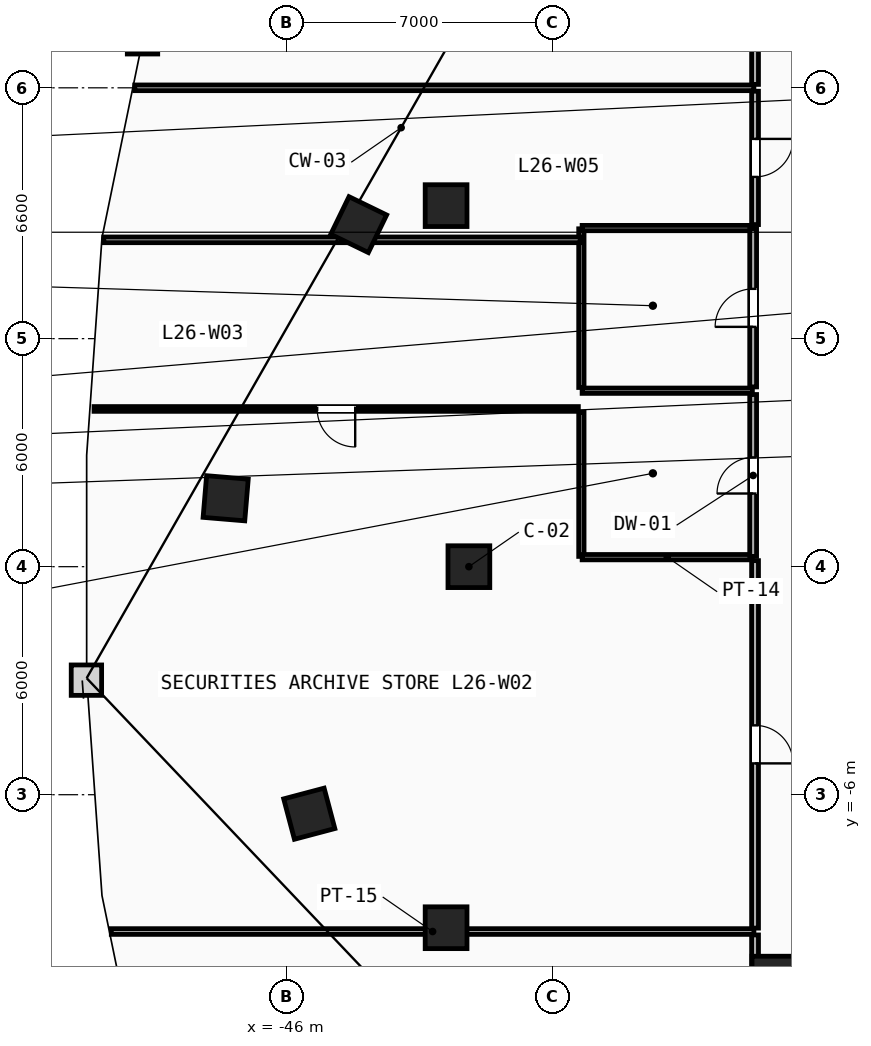
"""IFC4 building model, lengths in metres.
Left out: names, types, materials, properties, quantities, classifications, styles, units other than length and angle.
Written with IfcOpenShell. Run it as: python <this file> out.ifc"""

import sys

from ifc_helpers import new_model, si_unit, direction, frame, frame_2d, origin, origin_2d, place, context, subcontext, project, spatial, rectangle, extrude, element, fill, save


model = new_model("IFC4")
c1 = context("Model", 3, precision=1e-05, world=origin(), true_north=direction((0.0, 1.0)))
c2 = subcontext(c1, "Body", "Model", "MODEL_VIEW")
j1 = project(units=[si_unit("LENGTHUNIT", "METRE"), si_unit("PLANEANGLEUNIT", "RADIAN")], contexts=[c1])
p1 = place(None, origin())
s1 = spatial("IfcSite", under=j1, at=p1, CompositionType="ELEMENT")
p2 = place(p1, origin())
s2 = spatial("IfcBuilding", under=s1, at=p2, CompositionType="ELEMENT")
p3 = place(p2, frame((0.0, 0.0, 103.4)))
s3 = spatial("IfcBuildingStorey", under=s2, at=p3, CompositionType="ELEMENT", Elevation=103.4)
for number, where, z_axis, x_axis in (
    (1, (-41.2, 0.0, 0.0), (0.0, 0.0, 1.0), (1.0, 0.0, 0.0)),
    (2, (-41.8, 9.5, 0.0), (0.0, 0.0, 1.0), (1.0, 0.0, 0.0)),
    (3, (-41.8, -9.5, 0.0), (0.0, 0.0, 1.0), (1.0, 0.0, 0.0)),
    (4, (-33.2, -10.8, 0.0), (0.0, 0.0, 1.0), (1.0, 0.0, 0.0)),
    (5, (-44.1, 9.0, 0.0), (0.0, 0.0, 1.0), (-0.437, -0.899, 0.0)),
    (6, (-47.6, 1.8, 0.0), (0.0, 0.0, 1.0), (-0.084, -0.997, 0.0)),
    (7, (-45.4, -6.5, 0.0), (0.0, 0.0, 1.0), (0.256, -0.967, 0.0)),
):
    element("IfcColumn", number, at=place(p3, frame(where, z_axis=z_axis, x_axis=x_axis)), inside=s3, PredefinedType="COLUMN", context=c2, shape_type="SweptSolid", body=[
        extrude(rectangle(XDim=1.1, YDim=1.1, at=origin_2d()), origin(), (0.0, 0.0, 1.0), 3.6),
    ])
p4 = place(p3, frame((-38.24, 0.27, 0.0), z_axis=(0.0, 0.0, 1.0), x_axis=(0.0, 1.0, 0.0)))
e8 = element("IfcWall", 8, at=p4, inside=s3, PredefinedType="PARTITIONING", context=c2, shape_type="SweptSolid", body=[
    extrude(rectangle(XDim=3.795, YDim=0.14, at=frame_2d((1.897, 0.0))), origin(), (0.0, 0.0, 1.0), 3.3),
])
p5 = place(p3, frame((-38.24, 4.715, 0.0), z_axis=(0.0, 0.0, 1.0), x_axis=(0.0, 1.0, 0.0)))
e9 = element("IfcWall", 9, at=p5, inside=s3, PredefinedType="PARTITIONING", context=c2, shape_type="SweptSolid", body=[
    extrude(rectangle(XDim=4.175, YDim=0.14, at=frame_2d((2.087, 0.0))), origin(), (0.0, 0.0, 1.0), 3.3),
])
for number, where, z_axis, x_axis in (
    (10, (-38.22, 0.25, 0.0), (0.0, 0.0, 1.0), (1.0, 0.0, 0.0)),
    (11, (-38.22, 4.63, 0.0), (0.0, 0.0, 1.0), (1.0, 0.0, 0.0)),
    (12, (-38.22, 8.91, 0.0), (0.0, 0.0, 1.0), (1.0, 0.0, 0.0)),
):
    element("IfcWall", number, at=place(p3, frame(where, z_axis=z_axis, x_axis=x_axis)), inside=s3, PredefinedType="PARTITIONING", context=c2, shape_type="SweptSolid", body=[
        extrude(rectangle(XDim=4.48, YDim=0.14, at=frame_2d((2.24, 0.0))), origin(), (0.0, 0.0, 1.0), 3.3),
    ])
p6 = place(p3, frame((-33.72, 0.27, 0.0), z_axis=(0.0, 0.0, 1.0), x_axis=(0.0, 1.0, 0.0)))
e13 = element("IfcWall", 13, at=p6, inside=s3, PredefinedType="PARTITIONING", context=c2, shape_type="SweptSolid", body=[
    extrude(rectangle(XDim=4.26, YDim=0.18, at=frame_2d((2.13, 0.0))), origin(), (0.0, 0.0, 1.0), 3.3),
])
p7 = place(p6, frame((1.655, 0.0, 0.0)))
e14 = element("IfcOpeningElement", 14, at=p7, cuts=e13, PredefinedType="OPENING", context=c2, shape_type="SweptSolid", body=[
    extrude(rectangle(XDim=0.95, YDim=2.1, at=frame_2d((0.475, 1.05))), frame((0.0, 0.1, 0.0), z_axis=(0.0, -1.0, 0.0), x_axis=(1.0, 0.0, 0.0)), (0.0, 0.0, 1.0), 0.2),
])
p8 = place(p3, frame((-33.72, 4.73, 0.0), z_axis=(0.0, 0.0, 1.0), x_axis=(0.0, 1.0, 0.0)))
e15 = element("IfcWall", 15, at=p8, inside=s3, PredefinedType="PARTITIONING", context=c2, shape_type="SweptSolid", body=[
    extrude(rectangle(XDim=4.16, YDim=0.18, at=frame_2d((2.08, 0.0))), origin(), (0.0, 0.0, 1.0), 3.3),
])
p9 = place(p8, frame((1.58, 0.0, 0.0)))
e16 = element("IfcOpeningElement", 16, at=p9, cuts=e15, PredefinedType="OPENING", context=c2, shape_type="SweptSolid", body=[
    extrude(rectangle(XDim=1.0, YDim=2.15, at=frame_2d((0.5, 1.075))), frame((0.0, 0.1, 0.0), z_axis=(0.0, -1.0, 0.0), x_axis=(1.0, 0.0, 0.0)), (0.0, 0.0, 1.0), 0.2),
])
p10 = place(p3, frame((-50.61, -9.6, 0.0), z_axis=(0.0, 0.0, 1.0), x_axis=(1.0, 0.0, 0.0)))
e17 = element("IfcWall", 17, at=p10, inside=s3, PredefinedType="PARTITIONING", context=c2, shape_type="SweptSolid", body=[
    extrude(rectangle(XDim=16.91, YDim=0.15, at=frame_2d((8.455, 0.0))), origin(), (0.0, 0.0, 1.0), 2.605),
])
p11 = place(p3, frame((-50.809, 8.6, 0.0), z_axis=(0.0, 0.0, 1.0), x_axis=(1.0, 0.0, 0.0)))
e18 = element("IfcWall", 18, at=p11, inside=s3, PredefinedType="PARTITIONING", context=c2, shape_type="SweptSolid", body=[
    extrude(rectangle(XDim=12.539, YDim=0.15, at=frame_2d((6.269, 0.0))), origin(), (0.0, 0.0, 1.0), 3.3),
])
p12 = place(p3, frame((-49.993, 12.6, 0.0), z_axis=(0.0, 0.0, 1.0), x_axis=(1.0, 0.0, 0.0)))
e19 = element("IfcWall", 19, at=p12, inside=s3, PredefinedType="PARTITIONING", context=c2, shape_type="SweptSolid", body=[
    extrude(rectangle(XDim=16.293, YDim=0.15, at=frame_2d((8.146, 0.0))), origin(), (0.0, 0.0, 1.0), 3.3),
])
p13 = place(p3, frame((-33.67, -9.69, 0.0), z_axis=(0.0, 0.0, 1.0), x_axis=(0.0, -1.0, 0.0)))
e20 = element("IfcWall", 20, at=p13, inside=s3, PredefinedType="PARTITIONING", context=c2, shape_type="SweptSolid", body=[
    extrude(rectangle(XDim=1.71, YDim=0.18, at=frame_2d((0.855, 0.0))), origin(), (0.0, 0.0, 1.0), 3.3),
])
p14 = place(p3, frame((-33.67, 0.159, 0.0), z_axis=(0.0, 0.0, 1.0), x_axis=(0.0, -1.0, 0.0)))
e21 = element("IfcWall", 21, at=p14, inside=s3, PredefinedType="PARTITIONING", context=c2, shape_type="SweptSolid", body=[
    extrude(rectangle(XDim=9.669, YDim=0.18, at=frame_2d((4.834, 0.0))), origin(), (0.0, 0.0, 1.0), 3.3),
])
p15 = place(p14, frame((4.334, 0.0, 0.0)))
e22 = element("IfcOpeningElement", 22, at=p15, cuts=e21, PredefinedType="OPENING", context=c2, shape_type="SweptSolid", body=[
    extrude(rectangle(XDim=1.0, YDim=2.15, at=frame_2d((0.5, 1.075))), frame((0.0, 0.1, 0.0), z_axis=(0.0, -1.0, 0.0), x_axis=(1.0, 0.0, 0.0)), (0.0, 0.0, 1.0), 0.2),
])
p16 = place(p3, frame((-33.67, 17.428, 0.0), z_axis=(0.0, 0.0, 1.0), x_axis=(0.0, -1.0, 0.0)))
e23 = element("IfcWall", 23, at=p16, inside=s3, PredefinedType="PARTITIONING", context=c2, shape_type="SweptSolid", body=[
    extrude(rectangle(XDim=4.739, YDim=0.18, at=frame_2d((2.369, 0.0))), origin(), (0.0, 0.0, 1.0), 3.3),
])
p17 = place(p3, frame((-33.67, 12.51, 0.0), z_axis=(0.0, 0.0, 1.0), x_axis=(0.0, -1.0, 0.0)))
e24 = element("IfcWall", 24, at=p17, inside=s3, PredefinedType="PARTITIONING", context=c2, shape_type="SweptSolid", body=[
    extrude(rectangle(XDim=3.509, YDim=0.18, at=frame_2d((1.754, 0.0))), origin(), (0.0, 0.0, 1.0), 3.3),
])
p18 = place(p17, frame((1.254, 0.0, 0.0)))
e25 = element("IfcOpeningElement", 25, at=p18, cuts=e24, PredefinedType="OPENING", context=c2, shape_type="SweptSolid", body=[
    extrude(rectangle(XDim=1.0, YDim=2.15, at=frame_2d((0.5, 1.075))), frame((0.0, 0.1, 0.0), z_axis=(0.0, -1.0, 0.0), x_axis=(1.0, 0.0, 0.0)), (0.0, 0.0, 1.0), 0.2),
])
p19 = place(p3, frame((-38.32, 4.15, 0.0), z_axis=(0.0, 0.0, 1.0), x_axis=(-1.0, 0.0, 0.0)))
e26 = element("IfcWall", 26, at=p19, inside=s3, PredefinedType="PARTITIONING", context=c2, shape_type="SweptSolid", body=[
    extrude(rectangle(XDim=12.744, YDim=0.125, at=frame_2d((6.372, 0.0))), origin(), (0.0, 0.0, 1.0), 3.3),
])
p20 = place(p19, frame((5.872, 0.0, 0.0)))
e27 = element("IfcOpeningElement", 27, at=p20, cuts=e26, PredefinedType="OPENING", context=c2, shape_type="SweptSolid", body=[
    extrude(rectangle(XDim=1.0, YDim=2.15, at=frame_2d((0.5, 1.075))), frame((0.0, 0.073, 0.0), z_axis=(0.0, -1.0, 0.0), x_axis=(1.0, 0.0, 0.0)), (0.0, 0.0, 1.0), 0.145),
])
p21 = place(p20, origin())
e28 = element("IfcDoor", 28, at=p21, inside=s3, OperationType="SINGLE_SWING_LEFT", PredefinedType="DOOR", context=c2, shape_type="SweptSolid", body=[
    extrude(rectangle(XDim=1.0, YDim=2.15, at=frame_2d((0.5, 1.075))), frame((0.0, 0.025, 0.0), z_axis=(0.0, -1.0, 0.0), x_axis=(1.0, 0.0, 0.0)), (0.0, 0.0, 1.0), 0.05),
])
fill(e27, e28)
p22 = place(p15, origin())
e29 = element("IfcDoor", 29, at=p22, inside=s3, OperationType="SINGLE_SWING_RIGHT", PredefinedType="DOOR", context=c2, shape_type="SweptSolid", body=[
    extrude(rectangle(XDim=1.0, YDim=2.15, at=frame_2d((0.5, 1.075))), frame((0.0, 0.025, 0.0), z_axis=(0.0, -1.0, 0.0), x_axis=(1.0, 0.0, 0.0)), (0.0, 0.0, 1.0), 0.05),
])
fill(e22, e29)
p23 = place(p7, origin())
e30 = element("IfcDoor", 30, at=p23, inside=s3, OperationType="SINGLE_SWING_LEFT", PredefinedType="DOOR", context=c2, shape_type="SweptSolid", body=[
    extrude(rectangle(XDim=0.95, YDim=2.1, at=frame_2d((0.475, 1.05))), frame((0.0, 0.025, 0.0), z_axis=(0.0, -1.0, 0.0), x_axis=(1.0, 0.0, 0.0)), (0.0, 0.0, 1.0), 0.05),
])
fill(e14, e30)
p24 = place(p9, origin())
e31 = element("IfcDoor", 31, at=p24, inside=s3, OperationType="SINGLE_SWING_LEFT", PredefinedType="DOOR", context=c2, shape_type="SweptSolid", body=[
    extrude(rectangle(XDim=1.0, YDim=2.15, at=frame_2d((0.5, 1.075))), frame((0.0, 0.025, 0.0), z_axis=(0.0, -1.0, 0.0), x_axis=(1.0, 0.0, 0.0)), (0.0, 0.0, 1.0), 0.05),
])
fill(e16, e31)
p25 = place(p18, origin())
e32 = element("IfcDoor", 32, at=p25, inside=s3, OperationType="SINGLE_SWING_LEFT", PredefinedType="DOOR", context=c2, shape_type="SweptSolid", body=[
    extrude(rectangle(XDim=1.0, YDim=2.15, at=frame_2d((0.5, 1.075))), frame((0.0, 0.025, 0.0), z_axis=(0.0, -1.0, 0.0), x_axis=(1.0, 0.0, 0.0)), (0.0, 0.0, 1.0), 0.05),
])
fill(e25, e32)
save(model, sys.argv[1])
